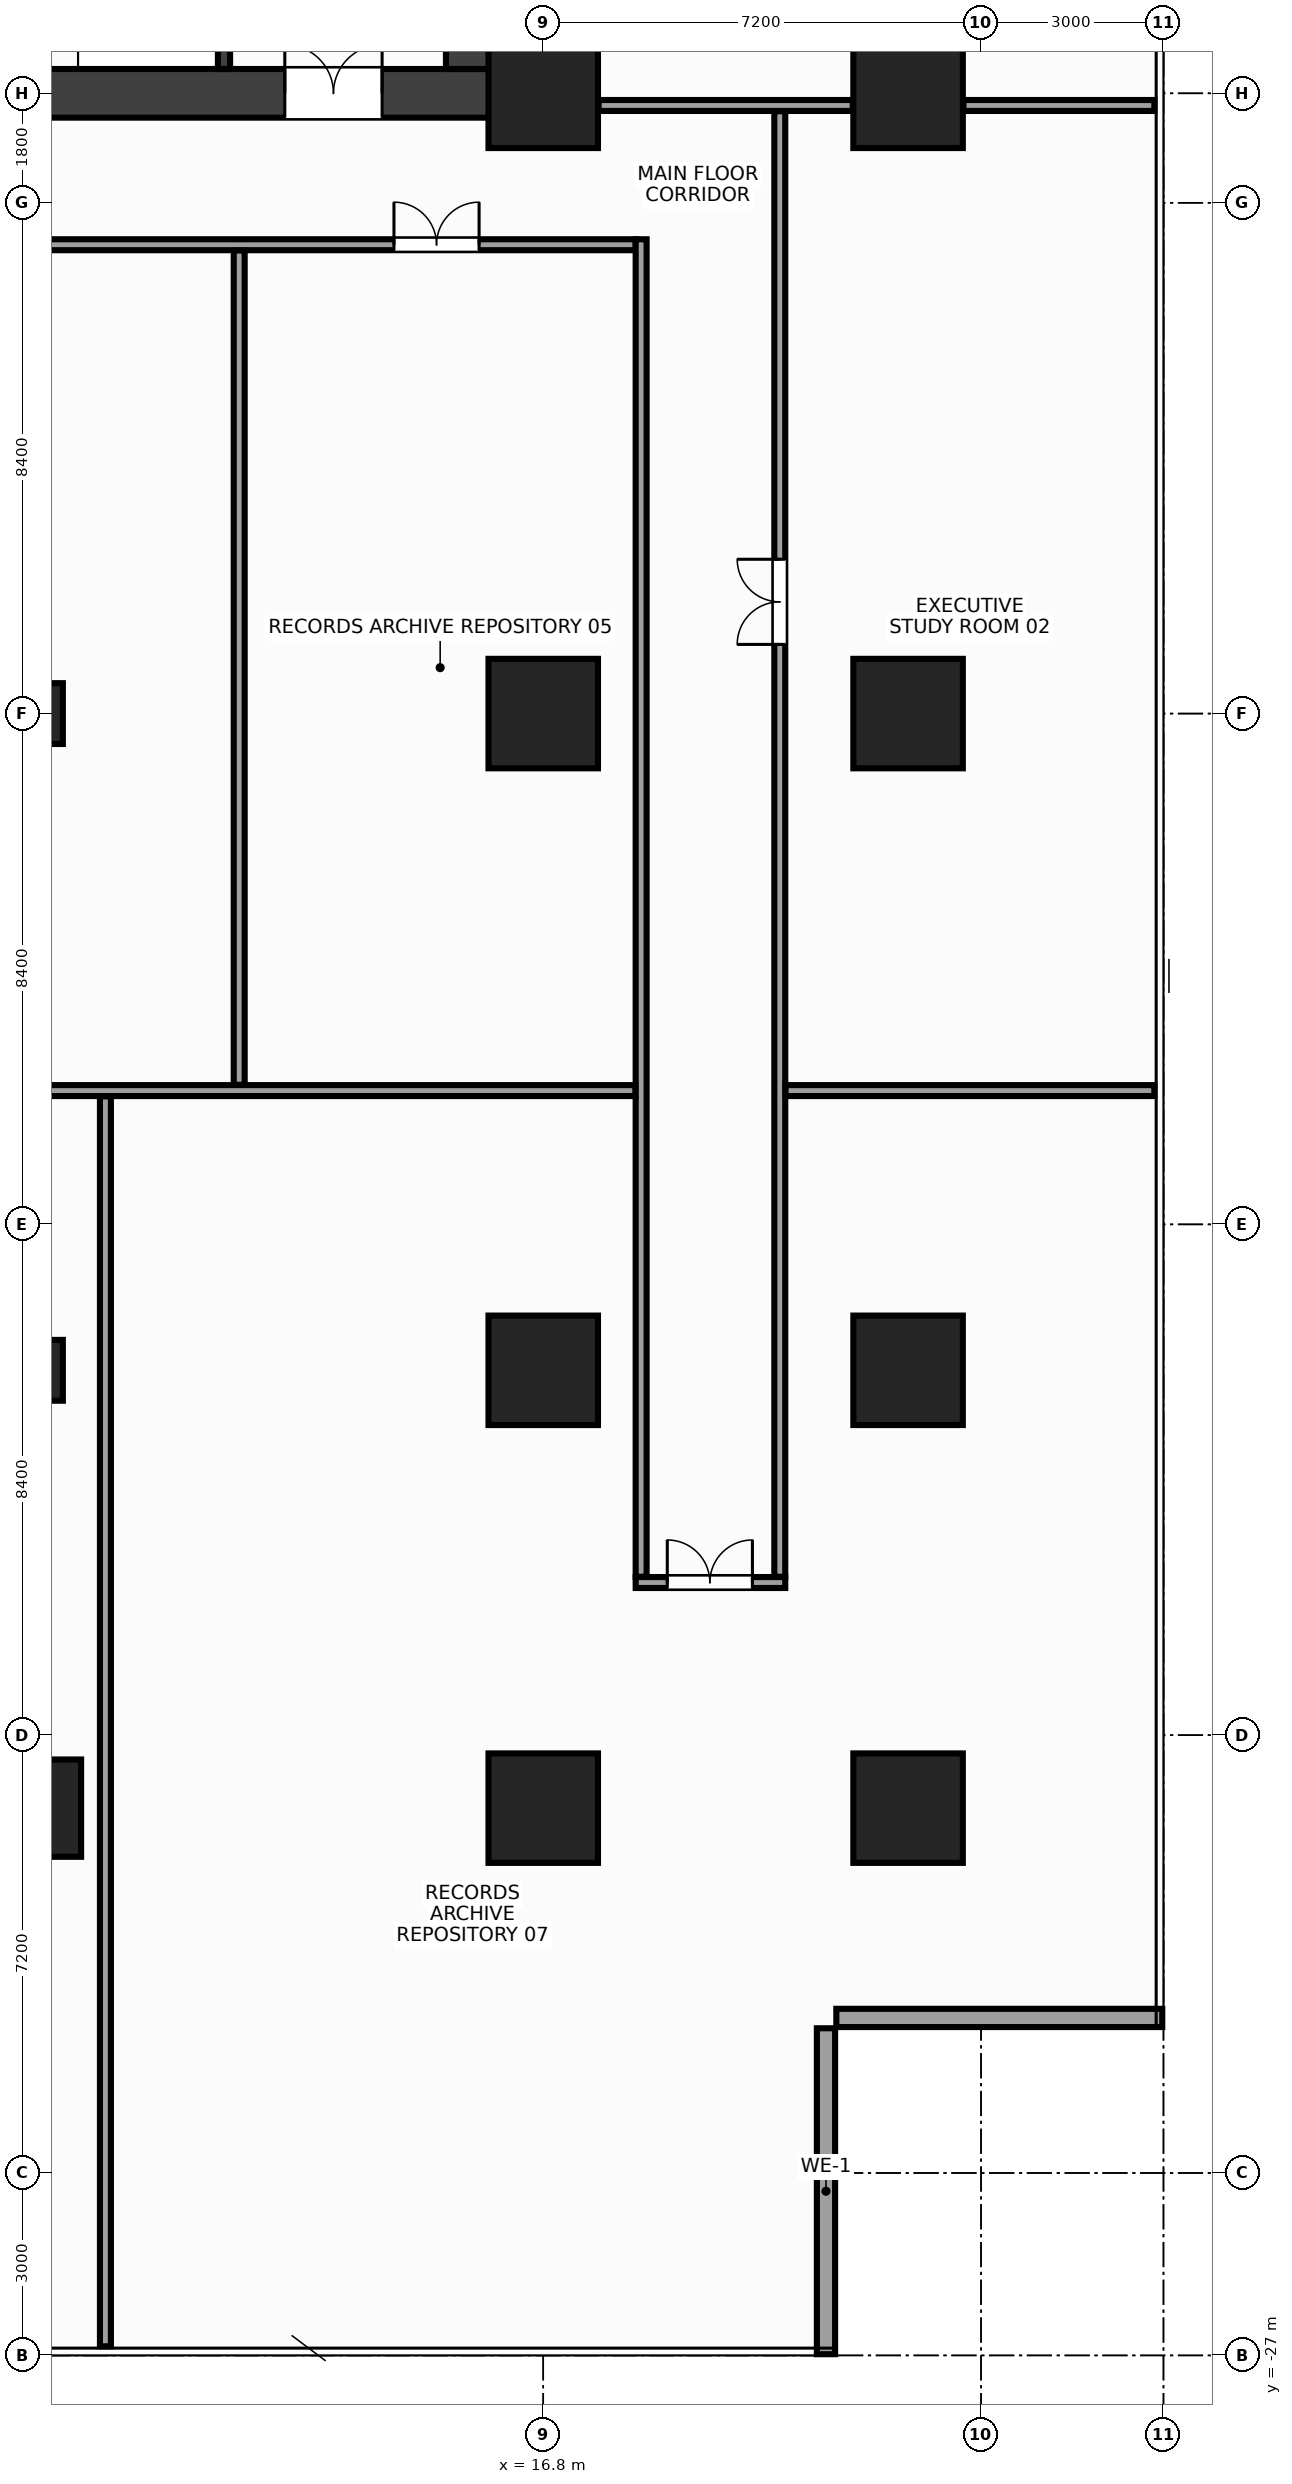
"""IFC4 building model, lengths in metres.
Left out: names, types, materials, properties, quantities, classifications, styles, units other than length and angle.
Written with IfcOpenShell. Run it as: python <this file> out.ifc"""

import sys

from ifc_helpers import new_model, si_unit, direction, frame, frame_2d, origin, origin_2d, place, context, subcontext, project, spatial, rectangle, hollow_rectangle, extrude, source, transform, mapped, element, fill, save


model = new_model("IFC4")
c1 = context("Model", 3, precision=1e-05, world=origin(), true_north=direction((0.0, 1.0)))
c2 = subcontext(c1, "Body", "Model", "MODEL_VIEW")
j1 = project(units=[si_unit("LENGTHUNIT", "METRE"), si_unit("PLANEANGLEUNIT", "RADIAN")], contexts=[c1])
p1 = place(None, origin())
s1 = spatial("IfcSite", under=j1, at=p1, CompositionType="ELEMENT")
p2 = place(p1, origin())
s2 = spatial("IfcBuilding", under=s1, at=p2, CompositionType="ELEMENT")
p3 = place(p2, frame((0.0, 0.0, 63.2)))
s3 = spatial("IfcBuildingStorey", under=s2, at=p3, CompositionType="ELEMENT", Elevation=63.2)
m1 = source(origin(), c2, "Body", "SweptSolid", [
    extrude(rectangle(XDim=32.0, YDim=0.8, at=frame_2d((16.0, 0.0))), origin(), (0.0, 0.0, 1.0), 3.6),
])
p4 = place(p3, frame((-16.0, 10.2, 0.0), z_axis=(0.0, 0.0, 1.0), x_axis=(1.0, 0.0, 0.0)))
e1 = element("IfcWall", 1, at=p4, inside=s3, PredefinedType="SHEAR", context=c2, shape_type="MappedRepresentation", body=[
    mapped(m1, transform((0.0, 0.0, 0.0), x_axis=(1.0, 0.0, 0.0), y_axis=(0.0, 1.0, 0.0), z_axis=(0.0, 0.0, 1.0), scale=1.0)),
])
p5 = place(p4, frame((1.85, 0.0, 0.0)))
e2 = element("IfcOpeningElement", 2, at=p5, cuts=e1, PredefinedType="OPENING", context=c2, shape_type="SweptSolid", body=[
    extrude(rectangle(XDim=1.6, YDim=2.15, at=frame_2d((0.8, 1.075))), frame((0.0, 0.412, 0.0), z_axis=(0.0, -1.0, 0.0), x_axis=(1.0, 0.0, 0.0)), (0.0, 0.0, 1.0), 0.824),
])
p6 = place(p4, frame((28.55, 0.0, 0.0)))
e3 = element("IfcOpeningElement", 3, at=p6, cuts=e1, PredefinedType="OPENING", context=c2, shape_type="SweptSolid", body=[
    extrude(rectangle(XDim=1.6, YDim=2.15, at=frame_2d((0.8, 1.075))), frame((0.0, 0.412, 0.0), z_axis=(0.0, -1.0, 0.0), x_axis=(1.0, 0.0, 0.0)), (0.0, 0.0, 1.0), 0.824),
])
p7 = place(p4, frame((15.25, 0.0, 0.0)))
e4 = element("IfcOpeningElement", 4, at=p7, cuts=e1, PredefinedType="OPENING", context=c2, shape_type="SweptSolid", body=[
    extrude(rectangle(XDim=1.5, YDim=2.2, at=frame_2d((0.75, 1.1))), frame((0.0, 0.412, 0.0), z_axis=(0.0, -1.0, 0.0), x_axis=(1.0, 0.0, 0.0)), (0.0, 0.0, 1.0), 0.824),
])
m2 = source(origin(), c2, "Body", "SweptSolid", [
    extrude(rectangle(XDim=12.8, YDim=0.8, at=frame_2d((6.4, 0.0))), origin(), (0.0, 0.0, 1.0), 3.6),
])
p8 = place(p3, frame((15.6, 10.6, 0.0), z_axis=(0.0, 0.0, 1.0), x_axis=(0.0, 1.0, 0.0)))
e5 = element("IfcWall", 5, at=p8, inside=s3, PredefinedType="SHEAR", context=c2, shape_type="MappedRepresentation", body=[
    mapped(m2, transform((0.0, 0.0, 0.0), x_axis=(1.0, 0.0, 0.0), y_axis=(0.0, 1.0, 0.0), z_axis=(0.0, 0.0, 1.0), scale=1.0)),
])
m3 = source(origin(), c2, "Body", "SweptSolid", [
    extrude(rectangle(XDim=3.05, YDim=0.2, at=frame_2d((1.525, 0.0))), origin(), (0.0, 0.0, 1.0), 3.6),
])
p9 = place(p3, frame((11.55, 10.6, 0.0), z_axis=(0.0, 0.0, 1.0), x_axis=(0.0, 1.0, 0.0)))
e6 = element("IfcWall", 6, at=p9, inside=s3, PredefinedType="SHEAR", context=c2, shape_type="MappedRepresentation", body=[
    mapped(m3, transform((0.0, 0.0, 0.0), x_axis=(1.0, 0.0, 0.0), y_axis=(0.0, 1.0, 0.0), z_axis=(0.0, 0.0, 1.0), scale=1.0)),
])
p10 = place(p9, frame((0.9, 0.0, 0.0)))
e7 = element("IfcOpeningElement", 7, at=p10, cuts=e6, PredefinedType="OPENING", context=c2, shape_type="SweptSolid", body=[
    extrude(rectangle(XDim=1.1, YDim=2.15, at=frame_2d((0.55, 1.075))), frame((0.0, 0.112, 0.0), z_axis=(0.0, -1.0, 0.0), x_axis=(1.0, 0.0, 0.0)), (0.0, 0.0, 1.0), 0.224),
])
m4 = source(origin(), c2, "Body", "SweptSolid", [
    extrude(rectangle(XDim=1.8, YDim=1.8, at=origin_2d()), origin(), (0.0, 0.0, 1.0), 3.6),
])
for number, where, z_axis, x_axis in (
    (8, (16.8, -18.0, 0.0), (0.0, 0.0, 1.0), (1.0, 0.0, 0.0)),
    (9, (16.8, -10.8, 0.0), (0.0, 0.0, 1.0), (1.0, 0.0, 0.0)),
    (10, (16.8, 0.0, 0.0), (0.0, 0.0, 1.0), (1.0, 0.0, 0.0)),
    (11, (16.8, 10.2, 0.0), (0.0, 0.0, 1.0), (1.0, 0.0, 0.0)),
    (12, (22.8, -18.0, 0.0), (0.0, 0.0, 1.0), (1.0, 0.0, 0.0)),
    (13, (22.8, -10.8, 0.0), (0.0, 0.0, 1.0), (1.0, 0.0, 0.0)),
    (14, (22.8, 0.0, 0.0), (0.0, 0.0, 1.0), (1.0, 0.0, 0.0)),
    (15, (22.8, 10.2, 0.0), (0.0, 0.0, 1.0), (1.0, 0.0, 0.0)),
):
    element("IfcColumn", number, at=place(p3, frame(where, z_axis=z_axis, x_axis=x_axis)), inside=s3, PredefinedType="COLUMN", context=c2, shape_type="MappedRepresentation", body=[
        mapped(m4, transform((0.0, 0.0, 0.0), x_axis=(1.0, 0.0, 0.0), y_axis=(0.0, 1.0, 0.0), z_axis=(0.0, 0.0, 1.0), scale=1.0)),
    ])
m5 = source(origin(), c2, "Body", "SweptSolid", [
    extrude(rectangle(XDim=1.6, YDim=1.6, at=origin_2d()), origin(), (0.0, 0.0, 1.0), 3.6),
])
p11 = place(p3, frame((8.4, -18.0, 0.0), z_axis=(0.0, 0.0, 1.0), x_axis=(1.0, 0.0, 0.0)))
e16 = element("IfcColumn", 16, at=p11, inside=s3, PredefinedType="COLUMN", context=c2, shape_type="MappedRepresentation", body=[
    mapped(m5, transform((0.0, 0.0, 0.0), x_axis=(1.0, 0.0, 0.0), y_axis=(0.0, 1.0, 0.0), z_axis=(0.0, 0.0, 1.0), scale=1.0)),
])
m6 = source(origin(), c2, "Body", "SweptSolid", [
    extrude(hollow_rectangle(XDim=1.0, YDim=1.0, WallThickness=0.045, at=origin_2d()), origin(), (0.0, 0.0, 1.0), 3.6),
])
for number, where, z_axis, x_axis in (
    (17, (8.4, 0.0, 0.0), (0.0, 0.0, 1.0), (1.0, 0.0, 0.0)),
    (18, (8.4, -10.8, 0.0), (0.0, 0.0, 1.0), (1.0, 0.0, 0.0)),
):
    element("IfcColumn", number, at=place(p3, frame(where, z_axis=z_axis, x_axis=x_axis)), inside=s3, PredefinedType="COLUMN", context=c2, shape_type="MappedRepresentation", body=[
        mapped(m6, transform((0.0, 0.0, 0.0), x_axis=(1.0, 0.0, 0.0), y_axis=(0.0, 1.0, 0.0), z_axis=(0.0, 0.0, 1.0), scale=1.0)),
    ])
m7 = source(origin(), c2, "Body", "SweptSolid", [
    extrude(rectangle(XDim=5.36, YDim=0.3, at=frame_2d((2.68, 0.0))), origin(), (0.0, 0.0, 1.0), 2.74),
])
for number, where, z_axis, x_axis in (
    (19, (21.45, -26.98, 0.0), (0.0, 0.0, 1.0), (0.0, 1.0, 0.0)),
    (20, (21.62, -21.45, 0.0), (0.0, 0.0, 1.0), (1.0, 0.0, 0.0)),
):
    element("IfcWall", number, at=place(p3, frame(where, z_axis=z_axis, x_axis=x_axis)), inside=s3, PredefinedType="STANDARD", context=c2, shape_type="MappedRepresentation", body=[
        mapped(m7, transform((0.0, 0.0, 0.0), x_axis=(1.0, 0.0, 0.0), y_axis=(0.0, 1.0, 0.0), z_axis=(0.0, 0.0, 1.0), scale=1.0)),
    ])
m8 = source(origin(), c2, "Body", "SweptSolid", [
    extrude(rectangle(XDim=4.18, YDim=0.18, at=frame_2d((2.09, 0.0))), origin(), (0.0, 0.0, 1.0), 2.745),
])
p12 = place(p3, frame((17.71, 10.0, 0.0), z_axis=(0.0, 0.0, 1.0), x_axis=(1.0, 0.0, 0.0)))
e21 = element("IfcWall", 21, at=p12, inside=s3, PredefinedType="PARTITIONING", context=c2, shape_type="MappedRepresentation", body=[
    mapped(m8, transform((0.0, 0.0, 0.0), x_axis=(1.0, 0.0, 0.0), y_axis=(0.0, 1.0, 0.0), z_axis=(0.0, 0.0, 1.0), scale=1.0)),
])
m9 = source(origin(), c2, "Body", "SweptSolid", [
    extrude(rectangle(XDim=3.14, YDim=0.18, at=frame_2d((1.57, 0.0))), origin(), (0.0, 0.0, 1.0), 2.435),
])
p13 = place(p3, frame((23.71, 10.0, 0.0), z_axis=(0.0, 0.0, 1.0), x_axis=(1.0, 0.0, 0.0)))
e22 = element("IfcWall", 22, at=p13, inside=s3, PredefinedType="PARTITIONING", context=c2, shape_type="MappedRepresentation", body=[
    mapped(m9, transform((0.0, 0.0, 0.0), x_axis=(1.0, 0.0, 0.0), y_axis=(0.0, 1.0, 0.0), z_axis=(0.0, 0.0, 1.0), scale=1.0)),
])
m10 = source(origin(), c2, "Body", "SweptSolid", [
    extrude(rectangle(XDim=36.64, YDim=0.18, at=frame_2d((18.32, 0.0))), origin(), (0.0, 0.0, 1.0), 2.745),
])
p14 = place(p3, frame((-18.32, 7.71, 0.0), z_axis=(0.0, 0.0, 1.0), x_axis=(1.0, 0.0, 0.0)))
e23 = element("IfcWall", 23, at=p14, inside=s3, PredefinedType="PARTITIONING", context=c2, shape_type="MappedRepresentation", body=[
    mapped(m10, transform((0.0, 0.0, 0.0), x_axis=(1.0, 0.0, 0.0), y_axis=(0.0, 1.0, 0.0), z_axis=(0.0, 0.0, 1.0), scale=1.0)),
])
p15 = place(p14, frame((3.675, 0.0, 0.0)))
e24 = element("IfcOpeningElement", 24, at=p15, cuts=e23, PredefinedType="OPENING", context=c2, shape_type="SweptSolid", body=[
    extrude(rectangle(XDim=1.4, YDim=2.2, at=frame_2d((0.7, 1.1))), frame((0.0, 0.102, 0.0), z_axis=(0.0, -1.0, 0.0), x_axis=(1.0, 0.0, 0.0)), (0.0, 0.0, 1.0), 0.204),
])
p16 = place(p14, frame((17.62, 0.0, 0.0)))
e25 = element("IfcOpeningElement", 25, at=p16, cuts=e23, PredefinedType="OPENING", context=c2, shape_type="SweptSolid", body=[
    extrude(rectangle(XDim=1.4, YDim=2.2, at=frame_2d((0.7, 1.1))), frame((0.0, 0.102, 0.0), z_axis=(0.0, -1.0, 0.0), x_axis=(1.0, 0.0, 0.0)), (0.0, 0.0, 1.0), 0.204),
])
p17 = place(p14, frame((32.665, 0.0, 0.0)))
e26 = element("IfcOpeningElement", 26, at=p17, cuts=e23, PredefinedType="OPENING", context=c2, shape_type="SweptSolid", body=[
    extrude(rectangle(XDim=1.4, YDim=2.2, at=frame_2d((0.7, 1.1))), frame((0.0, 0.102, 0.0), z_axis=(0.0, -1.0, 0.0), x_axis=(1.0, 0.0, 0.0)), (0.0, 0.0, 1.0), 0.204),
])
m11 = source(origin(), c2, "Body", "SweptSolid", [
    extrude(rectangle(XDim=2.46, YDim=0.18, at=frame_2d((1.23, 0.0))), origin(), (0.0, 0.0, 1.0), 2.845),
])
p18 = place(p3, frame((18.32, -14.29, 0.0), z_axis=(0.0, 0.0, 1.0), x_axis=(1.0, 0.0, 0.0)))
e27 = element("IfcWall", 27, at=p18, inside=s3, PredefinedType="PARTITIONING", context=c2, shape_type="MappedRepresentation", body=[
    mapped(m11, transform((0.0, 0.0, 0.0), x_axis=(1.0, 0.0, 0.0), y_axis=(0.0, 1.0, 0.0), z_axis=(0.0, 0.0, 1.0), scale=1.0)),
])
p19 = place(p18, frame((0.52, 0.0, 0.0)))
e28 = element("IfcOpeningElement", 28, at=p19, cuts=e27, PredefinedType="OPENING", context=c2, shape_type="SweptSolid", body=[
    extrude(rectangle(XDim=1.4, YDim=2.2, at=frame_2d((0.7, 1.1))), frame((0.0, 0.102, 0.0), z_axis=(0.0, -1.0, 0.0), x_axis=(1.0, 0.0, 0.0)), (0.0, 0.0, 1.0), 0.204),
])
m12 = source(origin(), c2, "Body", "SweptSolid", [
    extrude(rectangle(XDim=21.995, YDim=0.18, at=frame_2d((10.998, 0.0))), origin(), (0.0, 0.0, 1.0), 2.745),
])
p20 = place(p3, frame((18.41, -14.195, 0.0), z_axis=(0.0, 0.0, 1.0), x_axis=(0.0, 1.0, 0.0)))
e29 = element("IfcWall", 29, at=p20, inside=s3, PredefinedType="PARTITIONING", context=c2, shape_type="MappedRepresentation", body=[
    mapped(m12, transform((0.0, 0.0, 0.0), x_axis=(1.0, 0.0, 0.0), y_axis=(0.0, 1.0, 0.0), z_axis=(0.0, 0.0, 1.0), scale=1.0)),
])
m13 = source(origin(), c2, "Body", "SweptSolid", [
    extrude(rectangle(XDim=24.1, YDim=0.18, at=frame_2d((12.05, 0.0))), origin(), (0.0, 0.0, 1.0), 2.745),
])
p21 = place(p3, frame((20.69, -14.195, 0.0), z_axis=(0.0, 0.0, 1.0), x_axis=(0.0, 1.0, 0.0)))
e30 = element("IfcWall", 30, at=p21, inside=s3, PredefinedType="PARTITIONING", context=c2, shape_type="MappedRepresentation", body=[
    mapped(m13, transform((0.0, 0.0, 0.0), x_axis=(1.0, 0.0, 0.0), y_axis=(0.0, 1.0, 0.0), z_axis=(0.0, 0.0, 1.0), scale=1.0)),
])
p22 = place(p21, frame((15.333, 0.0, 0.0)))
e31 = element("IfcOpeningElement", 31, at=p22, cuts=e30, PredefinedType="OPENING", context=c2, shape_type="SweptSolid", body=[
    extrude(rectangle(XDim=1.4, YDim=2.2, at=frame_2d((0.7, 1.1))), frame((0.0, 0.102, 0.0), z_axis=(0.0, -1.0, 0.0), x_axis=(1.0, 0.0, 0.0)), (0.0, 0.0, 1.0), 0.204),
])
m14 = source(origin(), c2, "Body", "SweptSolid", [
    extrude(rectangle(XDim=36.63, YDim=0.18, at=frame_2d((18.315, 0.0))), origin(), (0.0, 0.0, 1.0), 2.745),
])
p23 = place(p3, frame((-18.315, -6.2, 0.0), z_axis=(0.0, 0.0, 1.0), x_axis=(1.0, 0.0, 0.0)))
e32 = element("IfcWall", 32, at=p23, inside=s3, PredefinedType="PARTITIONING", context=c2, shape_type="MappedRepresentation", body=[
    mapped(m14, transform((0.0, 0.0, 0.0), x_axis=(1.0, 0.0, 0.0), y_axis=(0.0, 1.0, 0.0), z_axis=(0.0, 0.0, 1.0), scale=1.0)),
])
p24 = place(p23, frame((4.115, 0.0, 0.0)))
e33 = element("IfcOpeningElement", 33, at=p24, cuts=e32, PredefinedType="OPENING", context=c2, shape_type="SweptSolid", body=[
    extrude(rectangle(XDim=1.4, YDim=2.2, at=frame_2d((0.7, 1.1))), frame((0.0, 0.102, 0.0), z_axis=(0.0, -1.0, 0.0), x_axis=(1.0, 0.0, 0.0)), (0.0, 0.0, 1.0), 0.204),
])
p25 = place(p23, frame((21.215, 0.0, 0.0)))
e34 = element("IfcOpeningElement", 34, at=p25, cuts=e32, PredefinedType="OPENING", context=c2, shape_type="SweptSolid", body=[
    extrude(rectangle(XDim=1.4, YDim=2.2, at=frame_2d((0.7, 1.1))), frame((0.0, 0.102, 0.0), z_axis=(0.0, -1.0, 0.0), x_axis=(1.0, 0.0, 0.0)), (0.0, 0.0, 1.0), 0.204),
])
m15 = source(origin(), c2, "Body", "SweptSolid", [
    extrude(rectangle(XDim=6.065, YDim=0.18, at=frame_2d((3.033, 0.0))), origin(), (0.0, 0.0, 1.0), 2.745),
])
p26 = place(p3, frame((20.785, -6.2, 0.0), z_axis=(0.0, 0.0, 1.0), x_axis=(1.0, 0.0, 0.0)))
e35 = element("IfcWall", 35, at=p26, inside=s3, PredefinedType="PARTITIONING", context=c2, shape_type="MappedRepresentation", body=[
    mapped(m15, transform((0.0, 0.0, 0.0), x_axis=(1.0, 0.0, 0.0), y_axis=(0.0, 1.0, 0.0), z_axis=(0.0, 0.0, 1.0), scale=1.0)),
])
m16 = source(origin(), c2, "Body", "SweptSolid", [
    extrude(rectangle(XDim=13.72, YDim=0.18, at=frame_2d((6.86, 0.0))), origin(), (0.0, 0.0, 1.0), 2.645),
])
p27 = place(p3, frame((11.8, -6.105, 0.0), z_axis=(0.0, 0.0, 1.0), x_axis=(0.0, 1.0, 0.0)))
e36 = element("IfcWall", 36, at=p27, inside=s3, PredefinedType="PARTITIONING", context=c2, shape_type="MappedRepresentation", body=[
    mapped(m16, transform((0.0, 0.0, 0.0), x_axis=(1.0, 0.0, 0.0), y_axis=(0.0, 1.0, 0.0), z_axis=(0.0, 0.0, 1.0), scale=1.0)),
])
m17 = source(origin(), c2, "Body", "SweptSolid", [
    extrude(rectangle(XDim=20.555, YDim=0.18, at=frame_2d((10.278, 0.0))), origin(), (0.0, 0.0, 1.0), 2.745),
])
p28 = place(p3, frame((9.6, -26.85, 0.0), z_axis=(0.0, 0.0, 1.0), x_axis=(0.0, 1.0, 0.0)))
e37 = element("IfcWall", 37, at=p28, inside=s3, PredefinedType="PARTITIONING", context=c2, shape_type="MappedRepresentation", body=[
    mapped(m17, transform((0.0, 0.0, 0.0), x_axis=(1.0, 0.0, 0.0), y_axis=(0.0, 1.0, 0.0), z_axis=(0.0, 0.0, 1.0), scale=1.0)),
])
m18 = source(origin(), c2, "Body", "SweptSolid", [
    extrude(rectangle(XDim=1.6, YDim=2.15, at=frame_2d((0.8, 1.075))), frame((0.0, 0.025, 0.0), z_axis=(0.0, -1.0, 0.0), x_axis=(1.0, 0.0, 0.0)), (0.0, 0.0, 1.0), 0.05),
])
p29 = place(p6, origin())
e38 = element("IfcDoor", 38, at=p29, inside=s3, OperationType="DOUBLE_DOOR_SINGLE_SWING", PredefinedType="DOOR", context=c2, shape_type="MappedRepresentation", body=[
    mapped(m18, transform((0.0, 0.0, 0.0), x_axis=(1.0, 0.0, 0.0), y_axis=(0.0, 1.0, 0.0), z_axis=(0.0, 0.0, 1.0), scale=1.0)),
])
fill(e3, e38)
m19 = source(origin(), c2, "Body", "SweptSolid", [
    extrude(rectangle(XDim=1.4, YDim=2.2, at=frame_2d((0.7, 1.1))), frame((0.0, 0.025, 0.0), z_axis=(0.0, -1.0, 0.0), x_axis=(1.0, 0.0, 0.0)), (0.0, 0.0, 1.0), 0.05),
])
p30 = place(p22, origin())
e39 = element("IfcDoor", 39, at=p30, inside=s3, OperationType="DOUBLE_DOOR_SINGLE_SWING", PredefinedType="DOOR", context=c2, shape_type="MappedRepresentation", body=[
    mapped(m19, transform((0.0, 0.0, 0.0), x_axis=(1.0, 0.0, 0.0), y_axis=(0.0, 1.0, 0.0), z_axis=(0.0, 0.0, 1.0), scale=1.0)),
])
fill(e31, e39)
p31 = place(p17, origin())
e40 = element("IfcDoor", 40, at=p31, inside=s3, OperationType="DOUBLE_DOOR_SINGLE_SWING", PredefinedType="DOOR", context=c2, shape_type="MappedRepresentation", body=[
    mapped(m19, transform((0.0, 0.0, 0.0), x_axis=(1.0, 0.0, 0.0), y_axis=(0.0, 1.0, 0.0), z_axis=(0.0, 0.0, 1.0), scale=1.0)),
])
fill(e26, e40)
p32 = place(p19, origin())
e41 = element("IfcDoor", 41, at=p32, inside=s3, OperationType="DOUBLE_DOOR_SINGLE_SWING", PredefinedType="DOOR", context=c2, shape_type="MappedRepresentation", body=[
    mapped(m19, transform((0.0, 0.0, 0.0), x_axis=(1.0, 0.0, 0.0), y_axis=(0.0, 1.0, 0.0), z_axis=(0.0, 0.0, 1.0), scale=1.0)),
])
fill(e28, e41)
save(model, sys.argv[1])
